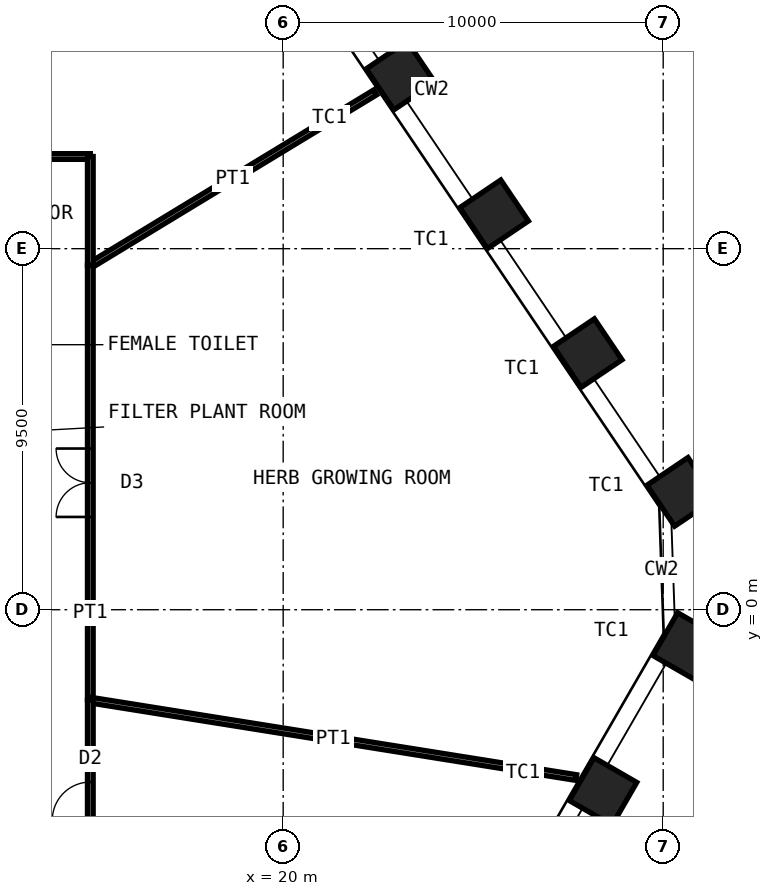
"""IFC4 building model, lengths in metres.
Left out: names, types, materials, properties, quantities, classifications, styles, units other than length and angle.
Written with IfcOpenShell. Run it as: python <this file> out.ifc"""

import sys

from ifc_helpers import new_model, si_unit, direction, frame, frame_2d, origin, origin_2d, place, context, subcontext, project, spatial, rectangle, hollow_rectangle, extrude, element, fill, save


model = new_model("IFC4")
c1 = context("Model", 3, precision=1e-05, world=origin(), true_north=direction((0.0, 1.0)))
c2 = subcontext(c1, "Body", "Model", "MODEL_VIEW")
j1 = project(units=[si_unit("LENGTHUNIT", "METRE"), si_unit("PLANEANGLEUNIT", "RADIAN")], contexts=[c1])
p1 = place(None, origin())
s1 = spatial("IfcSite", under=j1, at=p1, CompositionType="ELEMENT")
p2 = place(p1, origin())
s2 = spatial("IfcBuilding", under=s1, at=p2, CompositionType="ELEMENT")
p3 = place(p2, frame((0.0, 0.0, 52.0)))
s3 = spatial("IfcBuildingStorey", under=s2, at=p3, CompositionType="ELEMENT", Elevation=52.0)
for number, where, z_axis, x_axis in (
    (1, (23.087, 14.056, 0.0), (0.0, 0.0, 1.0), (-0.559, 0.829, 0.0)),
    (2, (25.55, 10.404, 0.0), (0.0, 0.0, 1.0), (-0.559, 0.829, 0.0)),
    (3, (28.013, 6.752, 0.0), (0.0, 0.0, 1.0), (-0.559, 0.829, 0.0)),
    (4, (30.476, 3.101, 0.0), (0.0, 0.0, 1.0), (-0.559, 0.829, 0.0)),
    (5, (30.618, -0.967, 0.0), (0.0, 0.0, 1.0), (0.5, 0.866, 0.0)),
    (6, (28.416, -4.782, 0.0), (0.0, 0.0, 1.0), (0.5, 0.866, 0.0)),
):
    element("IfcColumn", number, at=place(p3, frame(where, z_axis=z_axis, x_axis=x_axis)), inside=s3, PredefinedType="COLUMN", context=c2, shape_type="SweptSolid", body=[
        extrude(hollow_rectangle(XDim=1.3, YDim=1.3, WallThickness=0.1, at=origin_2d()), origin(), (0.0, 0.0, 1.0), 5.0),
    ])
p4 = place(p3, frame((22.421, 13.612, 0.0), z_axis=(0.0, 0.0, 1.0), x_axis=(-0.854791484761, -0.518971596121, 0.0)))
e7 = element("IfcWall", 7, at=p4, inside=s3, PredefinedType="PARTITIONING", context=c2, shape_type="SweptSolid", body=[
    extrude(rectangle(XDim=8.77, YDim=0.15, at=frame_2d((4.385, 0.0))), origin(), (0.0, 0.0, 1.0), 3.7),
])
p5 = place(p3, frame((14.925, 9.061, 0.0), z_axis=(0.0, 0.0, 1.0), x_axis=(0.0, -1.0, 0.0)))
e8 = element("IfcWall", 8, at=p5, inside=s3, PredefinedType="PARTITIONING", context=c2, shape_type="SweptSolid", body=[
    extrude(rectangle(XDim=11.439, YDim=0.15, at=frame_2d((5.72, 0.0))), origin(), (0.0, 0.0, 1.0), 4.8),
])
p6 = place(p5, frame((4.82, 0.0, 0.0)))
e9 = element("IfcOpeningElement", 9, at=p6, cuts=e8, PredefinedType="OPENING", context=c2, shape_type="SweptSolid", body=[
    extrude(rectangle(XDim=1.8, YDim=2.4, at=frame_2d((0.9, 1.2))), frame((0.0, 0.085, 0.0), z_axis=(0.0, -1.0, 0.0), x_axis=(1.0, 0.0, 0.0)), (0.0, 0.0, 1.0), 0.17),
])
p7 = place(p3, frame((27.711, -4.416, 0.0), z_axis=(0.0, 0.0, 1.0), x_axis=(-0.987539045088, 0.157374186021, 0.0)))
e10 = element("IfcWall", 10, at=p7, inside=s3, PredefinedType="PARTITIONING", context=c2, shape_type="SweptSolid", body=[
    extrude(rectangle(XDim=12.948, YDim=0.15, at=frame_2d((6.474, 0.0))), origin(), (0.0, 0.0, 1.0), 3.7),
])
p8 = place(p3, frame((14.925, -2.378, 0.0), z_axis=(0.0, 0.0, 1.0), x_axis=(0.0, -1.0, 0.0)))
e11 = element("IfcWall", 11, at=p8, inside=s3, PredefinedType="PARTITIONING", context=c2, shape_type="SweptSolid", body=[
    extrude(rectangle(XDim=5.312, YDim=0.15, at=frame_2d((2.656, 0.0))), origin(), (0.0, 0.0, 1.0), 4.8),
])
p9 = place(p8, frame((2.156, 0.0, 0.0)))
e12 = element("IfcOpeningElement", 12, at=p9, cuts=e11, PredefinedType="OPENING", context=c2, shape_type="SweptSolid", body=[
    extrude(rectangle(XDim=1.0, YDim=2.4, at=frame_2d((0.5, 1.2))), frame((0.0, 0.085, 0.0), z_axis=(0.0, -1.0, 0.0), x_axis=(1.0, 0.0, 0.0)), (0.0, 0.0, 1.0), 0.17),
])
p10 = place(p3, frame((17.517, 20.891, 0.0), z_axis=(0.0, 0.0, 1.0), x_axis=(-0.642515050703, -0.766273064658, 0.0)))
e13 = element("IfcWall", 13, at=p10, inside=s3, PredefinedType="PARTITIONING", context=c2, shape_type="SweptSolid", body=[
    extrude(rectangle(XDim=11.7, YDim=0.15, at=frame_2d((5.85, 0.0))), origin(), (0.0, 0.0, 1.0), 3.7),
])
p11 = place(p3, frame((9.999, 11.925, 0.0), z_axis=(0.0, 0.0, 1.0), x_axis=(1.0, 0.0, 0.0)))
e14 = element("IfcWall", 14, at=p11, inside=s3, PredefinedType="PARTITIONING", context=c2, shape_type="SweptSolid", body=[
    extrude(rectangle(XDim=4.926, YDim=0.15, at=frame_2d((2.463, 0.0))), origin(), (0.0, 0.0, 1.0), 4.8),
])
p12 = place(p11, frame((1.963, 0.0, 0.0)))
e15 = element("IfcOpeningElement", 15, at=p12, cuts=e14, PredefinedType="OPENING", context=c2, shape_type="SweptSolid", body=[
    extrude(rectangle(XDim=1.0, YDim=2.4, at=frame_2d((0.5, 1.2))), frame((0.0, 0.085, 0.0), z_axis=(0.0, -1.0, 0.0), x_axis=(1.0, 0.0, 0.0)), (0.0, 0.0, 1.0), 0.17),
])
p13 = place(p3, frame((14.925, 11.925, 0.0), z_axis=(0.0, 0.0, 1.0), x_axis=(0.0, -1.0, 0.0)))
e16 = element("IfcWall", 16, at=p13, inside=s3, PredefinedType="PARTITIONING", context=c2, shape_type="SweptSolid", body=[
    extrude(rectangle(XDim=2.864, YDim=0.15, at=frame_2d((1.432, 0.0))), origin(), (0.0, 0.0, 1.0), 4.8),
])
p14 = place(p6, origin())
e17 = element("IfcDoor", 17, at=p14, inside=s3, OperationType="DOUBLE_DOOR_DOUBLE_SWING", PredefinedType="DOOR", context=c2, shape_type="SweptSolid", body=[
    extrude(rectangle(XDim=1.8, YDim=2.4, at=frame_2d((0.9, 1.2))), frame((0.0, 0.025, 0.0), z_axis=(0.0, -1.0, 0.0), x_axis=(1.0, 0.0, 0.0)), (0.0, 0.0, 1.0), 0.05),
])
fill(e9, e17)
p15 = place(p9, origin())
e18 = element("IfcDoor", 18, at=p15, inside=s3, OperationType="SINGLE_SWING_RIGHT", PredefinedType="DOOR", context=c2, shape_type="SweptSolid", body=[
    extrude(rectangle(XDim=1.0, YDim=2.4, at=frame_2d((0.5, 1.2))), frame((0.0, 0.025, 0.0), z_axis=(0.0, -1.0, 0.0), x_axis=(1.0, 0.0, 0.0)), (0.0, 0.0, 1.0), 0.05),
])
fill(e12, e18)
save(model, sys.argv[1])
